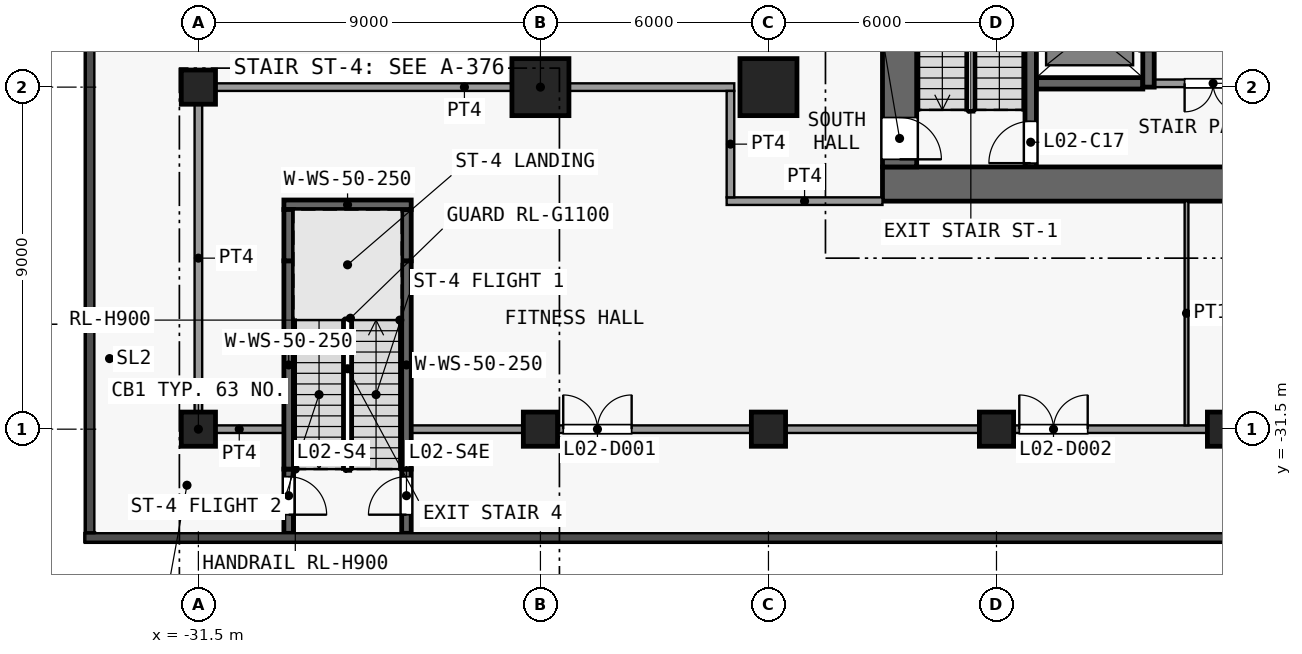
"""IFC4 building model, lengths in metres.
Left out: names, types, materials, properties, quantities, classifications, styles, units other than length and angle.
Written with IfcOpenShell. Run it as: python <this file> out.ifc"""

import sys

from ifc_helpers import new_model, si_unit, direction, frame, frame_2d, origin, origin_2d, place, context, subcontext, project, spatial, rectangle, extrude, element, fill, save


model = new_model("IFC4")
c1 = context("Model", 3, precision=1e-05, world=origin(), true_north=direction((0.0, 1.0)))
c2 = subcontext(c1, "Body", "Model", "MODEL_VIEW")
j1 = project(units=[si_unit("LENGTHUNIT", "METRE"), si_unit("PLANEANGLEUNIT", "RADIAN")], contexts=[c1])
p1 = place(None, origin())
s1 = spatial("IfcSite", under=j1, at=p1, CompositionType="ELEMENT")
p2 = place(p1, origin())
s2 = spatial("IfcBuilding", under=s1, at=p2, CompositionType="ELEMENT")
p3 = place(p2, frame((0.0, 0.0, 13.5)))
s3 = spatial("IfcBuildingStorey", under=s2, at=p3, CompositionType="ELEMENT", Elevation=13.5)
for number, where, z_axis, x_axis in (
    (1, (-31.5, -31.5, 0.0), (0.0, 0.0, 1.0), (1.0, 0.0, 0.0)),
    (2, (-31.5, -22.5, 0.0), (0.0, 0.0, 1.0), (1.0, 0.0, 0.0)),
    (3, (-22.5, -31.5, 0.0), (0.0, 0.0, 1.0), (1.0, 0.0, 0.0)),
):
    element("IfcColumn", number, at=place(p3, frame(where, z_axis=z_axis, x_axis=x_axis)), inside=s3, PredefinedType="COLUMN", context=c2, shape_type="SweptSolid", body=[
        extrude(rectangle(XDim=0.9, YDim=0.9, at=origin_2d()), origin(), (0.0, 0.0, 1.0), 5.0),
    ])
p4 = place(p3, frame((-22.5, -22.5, 0.0), z_axis=(0.0, 0.0, 1.0), x_axis=(1.0, 0.0, 0.0)))
e4 = element("IfcColumn", 4, at=p4, inside=s3, PredefinedType="COLUMN", context=c2, shape_type="SweptSolid", body=[
    extrude(rectangle(XDim=1.5, YDim=1.5, at=origin_2d()), origin(), (0.0, 0.0, 1.0), 5.0),
])
p5 = place(p3, frame((-16.5, -31.5, 0.0), z_axis=(0.0, 0.0, 1.0), x_axis=(1.0, 0.0, 0.0)))
e5 = element("IfcColumn", 5, at=p5, inside=s3, PredefinedType="COLUMN", context=c2, shape_type="SweptSolid", body=[
    extrude(rectangle(XDim=0.9, YDim=0.9, at=origin_2d()), origin(), (0.0, 0.0, 1.0), 5.0),
])
p6 = place(p3, frame((-16.5, -22.5, 0.0), z_axis=(0.0, 0.0, 1.0), x_axis=(1.0, 0.0, 0.0)))
e6 = element("IfcColumn", 6, at=p6, inside=s3, PredefinedType="COLUMN", context=c2, shape_type="SweptSolid", body=[
    extrude(rectangle(XDim=1.5, YDim=1.5, at=origin_2d()), origin(), (0.0, 0.0, 1.0), 5.0),
])
for number, where, z_axis, x_axis in (
    (7, (-10.5, -31.5, 0.0), (0.0, 0.0, 1.0), (1.0, 0.0, 0.0)),
    (8, (-4.5, -31.5, 0.0), (0.0, 0.0, 1.0), (1.0, 0.0, 0.0)),
):
    element("IfcColumn", number, at=place(p3, frame(where, z_axis=z_axis, x_axis=x_axis)), inside=s3, PredefinedType="COLUMN", context=c2, shape_type="SweptSolid", body=[
        extrude(rectangle(XDim=0.9, YDim=0.9, at=origin_2d()), origin(), (0.0, 0.0, 1.0), 5.0),
    ])
p7 = place(p3, frame((-13.5, -25.05, 0.0), z_axis=(0.0, 0.0, 1.0), x_axis=(1.0, 0.0, 0.0)))
e9 = element("IfcWall", 9, at=p7, inside=s3, PredefinedType="SHEAR", context=c2, shape_type="SweptSolid", body=[
    extrude(rectangle(XDim=27.0, YDim=0.9, at=frame_2d((13.5, 0.0))), origin(), (0.0, 0.0, 1.0), 4.65),
])
p8 = place(p3, frame((-13.05, -8.5, 0.0), z_axis=(0.0, 0.0, 1.0), x_axis=(0.0, -1.0, 0.0)))
e10 = element("IfcWall", 10, at=p8, inside=s3, PredefinedType="SHEAR", context=c2, shape_type="SweptSolid", body=[
    extrude(rectangle(XDim=16.1, YDim=0.9, at=frame_2d((8.05, 0.0))), origin(), (0.0, 0.0, 1.0), 4.65),
])
p9 = place(p8, frame((14.8, 0.0, 0.0)))
e11 = element("IfcOpeningElement", 11, at=p9, cuts=e10, PredefinedType="OPENING", context=c2, shape_type="SweptSolid", body=[
    extrude(rectangle(XDim=1.1, YDim=2.1, at=frame_2d((0.55, 1.05))), frame((0.0, 0.46, 0.0), z_axis=(0.0, -1.0, 0.0), x_axis=(1.0, 0.0, 0.0)), (0.0, 0.0, 1.0), 0.92),
])
p10 = place(p3, frame((-9.45, -22.4, 0.0), z_axis=(0.0, 0.0, 1.0), x_axis=(1.0, 0.0, 0.0)))
e12 = element("IfcWall", 12, at=p10, inside=s3, PredefinedType="SHEAR", context=c2, shape_type="SweptSolid", body=[
    extrude(rectangle(XDim=2.8, YDim=0.3, at=frame_2d((1.4, 0.0))), origin(), (0.0, 0.0, 1.0), 4.65),
])
p11 = place(p3, frame((-3.25, -22.4, 0.0), z_axis=(0.0, 0.0, 1.0), x_axis=(-1.0, 0.0, 0.0)))
e13 = element("IfcWall", 13, at=p11, inside=s3, PredefinedType="PARTITIONING", context=c2, shape_type="SweptSolid", body=[
    extrude(rectangle(XDim=3.1, YDim=0.2, at=frame_2d((1.55, 0.0))), origin(), (0.0, 0.0, 1.0), 4.65),
])
p12 = place(p11, frame((0.8, 0.0, 0.0)))
e14 = element("IfcOpeningElement", 14, at=p12, cuts=e13, PredefinedType="OPENING", context=c2, shape_type="SweptSolid", body=[
    extrude(rectangle(XDim=1.5, YDim=2.1, at=frame_2d((0.75, 1.05))), frame((0.0, 0.11, 0.0), z_axis=(0.0, -1.0, 0.0), x_axis=(1.0, 0.0, 0.0)), (0.0, 0.0, 1.0), 0.22),
])
p13 = place(p3, frame((-9.6, -24.6, 0.0), z_axis=(0.0, 0.0, 1.0), x_axis=(0.0, 1.0, 0.0)))
e15 = element("IfcWall", 15, at=p13, inside=s3, PredefinedType="SHEAR", context=c2, shape_type="SweptSolid", body=[
    extrude(rectangle(XDim=7.7, YDim=0.3, at=frame_2d((3.85, 0.0))), origin(), (0.0, 0.0, 1.0), 4.65),
])
p14 = place(p13, frame((0.1, 0.0, 0.0)))
e16 = element("IfcOpeningElement", 16, at=p14, cuts=e15, PredefinedType="OPENING", context=c2, shape_type="SweptSolid", body=[
    extrude(rectangle(XDim=1.1, YDim=2.1, at=frame_2d((0.55, 1.05))), frame((0.0, 0.16, 0.0), z_axis=(0.0, -1.0, 0.0), x_axis=(1.0, 0.0, 0.0)), (0.0, 0.0, 1.0), 0.32),
])
p15 = place(p3, frame((-6.5, -22.5, 0.0), z_axis=(0.0, 0.0, 1.0), x_axis=(0.0, 1.0, 0.0)))
e17 = element("IfcWall", 17, at=p15, inside=s3, PredefinedType="SHEAR", context=c2, shape_type="SweptSolid", body=[
    extrude(rectangle(XDim=14.0, YDim=0.3, at=frame_2d((7.0, 0.0))), origin(), (0.0, 0.0, 1.0), 4.65),
])
p16 = place(p15, frame((0.94, 0.0, 0.0)))
e18 = element("IfcOpeningElement", 18, at=p16, cuts=e17, PredefinedType="OPENING", context=c2, shape_type="SweptSolid", body=[
    extrude(rectangle(XDim=1.1, YDim=2.1, at=frame_2d((0.55, 1.05))), frame((0.0, 0.16, 0.0), z_axis=(0.0, -1.0, 0.0), x_axis=(1.0, 0.0, 0.0)), (0.0, 0.0, 1.0), 0.32),
])
p17 = place(p15, frame((3.72, 0.0, 0.0)))
e19 = element("IfcOpeningElement", 19, at=p17, cuts=e17, PredefinedType="OPENING", context=c2, shape_type="SweptSolid", body=[
    extrude(rectangle(XDim=1.1, YDim=2.1, at=frame_2d((0.55, 1.05))), frame((0.0, 0.16, 0.0), z_axis=(0.0, -1.0, 0.0), x_axis=(1.0, 0.0, 0.0)), (0.0, 0.0, 1.0), 0.32),
])
p18 = place(p15, frame((6.5, 0.0, 0.0)))
e20 = element("IfcOpeningElement", 20, at=p18, cuts=e17, PredefinedType="OPENING", context=c2, shape_type="SweptSolid", body=[
    extrude(rectangle(XDim=1.1, YDim=2.1, at=frame_2d((0.55, 1.05))), frame((0.0, 0.16, 0.0), z_axis=(0.0, -1.0, 0.0), x_axis=(1.0, 0.0, 0.0)), (0.0, 0.0, 1.0), 0.32),
])
p19 = place(p15, frame((9.28, 0.0, 0.0)))
e21 = element("IfcOpeningElement", 21, at=p19, cuts=e17, PredefinedType="OPENING", context=c2, shape_type="SweptSolid", body=[
    extrude(rectangle(XDim=1.1, YDim=2.1, at=frame_2d((0.55, 1.05))), frame((0.0, 0.16, 0.0), z_axis=(0.0, -1.0, 0.0), x_axis=(1.0, 0.0, 0.0)), (0.0, 0.0, 1.0), 0.32),
])
p20 = place(p15, frame((12.06, 0.0, 0.0)))
e22 = element("IfcOpeningElement", 22, at=p20, cuts=e17, PredefinedType="OPENING", context=c2, shape_type="SweptSolid", body=[
    extrude(rectangle(XDim=1.1, YDim=2.1, at=frame_2d((0.55, 1.05))), frame((0.0, 0.16, 0.0), z_axis=(0.0, -1.0, 0.0), x_axis=(1.0, 0.0, 0.0)), (0.0, 0.0, 1.0), 0.32),
])
p21 = place(p3, frame((-29.125, -32.55, 0.0), z_axis=(0.0, 0.0, 1.0), x_axis=(0.0, -1.0, 0.0)))
e23 = element("IfcWall", 23, at=p21, inside=s3, PredefinedType="SHEAR", context=c2, shape_type="SweptSolid", body=[
    extrude(rectangle(XDim=1.69, YDim=0.25, at=frame_2d((0.845, 0.0))), origin(), (0.0, 0.0, 1.0), 4.65),
])
p22 = place(p21, frame((0.2, 0.0, 0.0)))
e24 = element("IfcOpeningElement", 24, at=p22, cuts=e23, PredefinedType="OPENING", context=c2, shape_type="SweptSolid", body=[
    extrude(rectangle(XDim=1.0, YDim=2.1, at=frame_2d((0.5, 1.05))), frame((0.0, 0.135, 0.0), z_axis=(0.0, -1.0, 0.0), x_axis=(1.0, 0.0, 0.0)), (0.0, 0.0, 1.0), 0.27),
])
p23 = place(p3, frame((-29.125, -32.55, 0.0), z_axis=(0.0, 0.0, 1.0), x_axis=(0.0, 1.0, 0.0)))
e25 = element("IfcWall", 25, at=p23, inside=s3, PredefinedType="SHEAR", context=c2, shape_type="SweptSolid", body=[
    extrude(rectangle(XDim=5.48, YDim=0.25, at=frame_2d((2.74, 0.0))), origin(), (0.0, 0.0, 1.0), 4.65),
])
p24 = place(p3, frame((-29.125, -27.07, 0.0), z_axis=(0.0, 0.0, 1.0), x_axis=(0.0, 1.0, 0.0)))
e26 = element("IfcWall", 26, at=p24, inside=s3, PredefinedType="SHEAR", context=c2, shape_type="SweptSolid", body=[
    extrude(rectangle(XDim=1.35, YDim=0.25, at=frame_2d((0.675, 0.0))), origin(), (0.0, 0.0, 1.0), 4.65),
])
p25 = place(p3, frame((-26.025, -34.24, 0.0), z_axis=(0.0, 0.0, 1.0), x_axis=(0.0, 1.0, 0.0)))
e27 = element("IfcWall", 27, at=p25, inside=s3, PredefinedType="SHEAR", context=c2, shape_type="SweptSolid", body=[
    extrude(rectangle(XDim=1.69, YDim=0.25, at=frame_2d((0.845, 0.0))), origin(), (0.0, 0.0, 1.0), 4.65),
])
p26 = place(p25, frame((0.49, 0.0, 0.0)))
e28 = element("IfcOpeningElement", 28, at=p26, cuts=e27, PredefinedType="OPENING", context=c2, shape_type="SweptSolid", body=[
    extrude(rectangle(XDim=1.0, YDim=2.1, at=frame_2d((0.5, 1.05))), frame((0.0, 0.135, 0.0), z_axis=(0.0, -1.0, 0.0), x_axis=(1.0, 0.0, 0.0)), (0.0, 0.0, 1.0), 0.27),
])
p27 = place(p3, frame((-26.025, -32.55, 0.0), z_axis=(0.0, 0.0, 1.0), x_axis=(0.0, 1.0, 0.0)))
e29 = element("IfcWall", 29, at=p27, inside=s3, PredefinedType="SHEAR", context=c2, shape_type="SweptSolid", body=[
    extrude(rectangle(XDim=5.48, YDim=0.25, at=frame_2d((2.74, 0.0))), origin(), (0.0, 0.0, 1.0), 4.65),
])
p28 = place(p3, frame((-26.025, -27.07, 0.0), z_axis=(0.0, 0.0, 1.0), x_axis=(0.0, 1.0, 0.0)))
e30 = element("IfcWall", 30, at=p28, inside=s3, PredefinedType="SHEAR", context=c2, shape_type="SweptSolid", body=[
    extrude(rectangle(XDim=1.35, YDim=0.25, at=frame_2d((0.675, 0.0))), origin(), (0.0, 0.0, 1.0), 4.65),
])
p29 = place(p3, frame((-29.25, -25.595, 0.0), z_axis=(0.0, 0.0, 1.0), x_axis=(1.0, 0.0, 0.0)))
e31 = element("IfcWall", 31, at=p29, inside=s3, PredefinedType="SHEAR", context=c2, shape_type="SweptSolid", body=[
    extrude(rectangle(XDim=3.35, YDim=0.25, at=frame_2d((1.675, 0.0))), origin(), (0.0, 0.0, 1.0), 4.65),
])
p30 = place(p3, frame((-31.6, -31.5, 0.0), z_axis=(0.0, 0.0, 1.0), x_axis=(1.0, 0.0, 0.0)))
e32 = element("IfcWall", 32, at=p30, inside=s3, PredefinedType="PARTITIONING", context=c2, shape_type="SweptSolid", body=[
    extrude(rectangle(XDim=2.35, YDim=0.2, at=frame_2d((1.175, 0.0))), origin(), (0.0, 0.0, 1.0), 4.65),
])
p31 = place(p3, frame((-25.9, -31.5, 0.0), z_axis=(0.0, 0.0, 1.0), x_axis=(1.0, 0.0, 0.0)))
e33 = element("IfcWall", 33, at=p31, inside=s3, PredefinedType="PARTITIONING", context=c2, shape_type="SweptSolid", body=[
    extrude(rectangle(XDim=78.15, YDim=0.2, at=frame_2d((39.075, 0.0))), origin(), (0.0, 0.0, 1.0), 4.65),
])
p32 = place(p31, frame((4.0, 0.0, 0.0)))
e34 = element("IfcOpeningElement", 34, at=p32, cuts=e33, PredefinedType="OPENING", context=c2, shape_type="SweptSolid", body=[
    extrude(rectangle(XDim=1.8, YDim=2.1, at=frame_2d((0.9, 1.05))), frame((0.0, 0.11, 0.0), z_axis=(0.0, -1.0, 0.0), x_axis=(1.0, 0.0, 0.0)), (0.0, 0.0, 1.0), 0.22),
])
p33 = place(p31, frame((16.0, 0.0, 0.0)))
e35 = element("IfcOpeningElement", 35, at=p33, cuts=e33, PredefinedType="OPENING", context=c2, shape_type="SweptSolid", body=[
    extrude(rectangle(XDim=1.8, YDim=2.1, at=frame_2d((0.9, 1.05))), frame((0.0, 0.11, 0.0), z_axis=(0.0, -1.0, 0.0), x_axis=(1.0, 0.0, 0.0)), (0.0, 0.0, 1.0), 0.22),
])
p34 = place(p31, frame((24.1, 0.0, 0.0)))
e36 = element("IfcOpeningElement", 36, at=p34, cuts=e33, PredefinedType="OPENING", context=c2, shape_type="SweptSolid", body=[
    extrude(rectangle(XDim=1.0, YDim=2.1, at=frame_2d((0.5, 1.05))), frame((0.0, 0.11, 0.0), z_axis=(0.0, -1.0, 0.0), x_axis=(1.0, 0.0, 0.0)), (0.0, 0.0, 1.0), 0.22),
])
p35 = place(p31, frame((37.0, 0.0, 0.0)))
e37 = element("IfcOpeningElement", 37, at=p35, cuts=e33, PredefinedType="OPENING", context=c2, shape_type="SweptSolid", body=[
    extrude(rectangle(XDim=1.0, YDim=2.1, at=frame_2d((0.5, 1.05))), frame((0.0, 0.11, 0.0), z_axis=(0.0, -1.0, 0.0), x_axis=(1.0, 0.0, 0.0)), (0.0, 0.0, 1.0), 0.22),
])
p36 = place(p31, frame((46.4, 0.0, 0.0)))
e38 = element("IfcOpeningElement", 38, at=p36, cuts=e33, PredefinedType="OPENING", context=c2, shape_type="SweptSolid", body=[
    extrude(rectangle(XDim=1.0, YDim=2.1, at=frame_2d((0.5, 1.05))), frame((0.0, 0.11, 0.0), z_axis=(0.0, -1.0, 0.0), x_axis=(1.0, 0.0, 0.0)), (0.0, 0.0, 1.0), 0.22),
])
p37 = place(p31, frame((54.9, 0.0, 0.0)))
e39 = element("IfcOpeningElement", 39, at=p37, cuts=e33, PredefinedType="OPENING", context=c2, shape_type="SweptSolid", body=[
    extrude(rectangle(XDim=1.0, YDim=2.1, at=frame_2d((0.5, 1.05))), frame((0.0, 0.11, 0.0), z_axis=(0.0, -1.0, 0.0), x_axis=(1.0, 0.0, 0.0)), (0.0, 0.0, 1.0), 0.22),
])
p38 = place(p31, frame((60.1, 0.0, 0.0)))
e40 = element("IfcOpeningElement", 40, at=p38, cuts=e33, PredefinedType="OPENING", context=c2, shape_type="SweptSolid", body=[
    extrude(rectangle(XDim=1.0, YDim=2.1, at=frame_2d((0.5, 1.05))), frame((0.0, 0.11, 0.0), z_axis=(0.0, -1.0, 0.0), x_axis=(1.0, 0.0, 0.0)), (0.0, 0.0, 1.0), 0.22),
])
p39 = place(p31, frame((64.0, 0.0, 0.0)))
e41 = element("IfcOpeningElement", 41, at=p39, cuts=e33, PredefinedType="OPENING", context=c2, shape_type="SweptSolid", body=[
    extrude(rectangle(XDim=1.8, YDim=2.1, at=frame_2d((0.9, 1.05))), frame((0.0, 0.11, 0.0), z_axis=(0.0, -1.0, 0.0), x_axis=(1.0, 0.0, 0.0)), (0.0, 0.0, 1.0), 0.22),
])
p40 = place(p31, frame((73.0, 0.0, 0.0)))
e42 = element("IfcOpeningElement", 42, at=p40, cuts=e33, PredefinedType="OPENING", context=c2, shape_type="SweptSolid", body=[
    extrude(rectangle(XDim=1.8, YDim=2.1, at=frame_2d((0.9, 1.05))), frame((0.0, 0.11, 0.0), z_axis=(0.0, -1.0, 0.0), x_axis=(1.0, 0.0, 0.0)), (0.0, 0.0, 1.0), 0.22),
])
p41 = place(p3, frame((-17.6, -25.5, 0.0), z_axis=(0.0, 0.0, 1.0), x_axis=(1.0, 0.0, 0.0)))
e43 = element("IfcWall", 43, at=p41, inside=s3, PredefinedType="PARTITIONING", context=c2, shape_type="SweptSolid", body=[
    extrude(rectangle(XDim=4.1, YDim=0.2, at=frame_2d((2.05, 0.0))), origin(), (0.0, 0.0, 1.0), 4.65),
])
p42 = place(p3, frame((-31.6, -22.5, 0.0), z_axis=(0.0, 0.0, 1.0), x_axis=(1.0, 0.0, 0.0)))
e44 = element("IfcWall", 44, at=p42, inside=s3, PredefinedType="PARTITIONING", context=c2, shape_type="SweptSolid", body=[
    extrude(rectangle(XDim=14.2, YDim=0.2, at=frame_2d((7.1, 0.0))), origin(), (0.0, 0.0, 1.0), 4.65),
])
p43 = place(p3, frame((-31.5, -31.4, 0.0), z_axis=(0.0, 0.0, 1.0), x_axis=(0.0, 1.0, 0.0)))
e45 = element("IfcWall", 45, at=p43, inside=s3, PredefinedType="PARTITIONING", context=c2, shape_type="SweptSolid", body=[
    extrude(rectangle(XDim=8.8, YDim=0.2, at=frame_2d((4.4, 0.0))), origin(), (0.0, 0.0, 1.0), 4.65),
])
p44 = place(p3, frame((-17.5, -25.4, 0.0), z_axis=(0.0, 0.0, 1.0), x_axis=(0.0, 1.0, 0.0)))
e46 = element("IfcWall", 46, at=p44, inside=s3, PredefinedType="PARTITIONING", context=c2, shape_type="SweptSolid", body=[
    extrude(rectangle(XDim=2.8, YDim=0.2, at=frame_2d((1.4, 0.0))), origin(), (0.0, 0.0, 1.0), 4.65),
])
p45 = place(p3, frame((-5.5, -31.4, 0.0), z_axis=(0.0, 0.0, 1.0), x_axis=(0.0, 1.0, 0.0)))
e47 = element("IfcWall", 47, at=p45, inside=s3, PredefinedType="PARTITIONING", context=c2, shape_type="SweptSolid", body=[
    extrude(rectangle(XDim=5.9, YDim=0.1, at=frame_2d((2.95, 0.0))), origin(), (0.0, 0.0, 1.0), 4.65),
])
p46 = place(p12, origin())
e48 = element("IfcDoor", 48, at=p46, inside=s3, OperationType="DOUBLE_DOOR_SINGLE_SWING", PredefinedType="DOOR", context=c2, shape_type="SweptSolid", body=[
    extrude(rectangle(XDim=1.5, YDim=2.1, at=frame_2d((0.75, 1.05))), frame((0.0, 0.025, 0.0), z_axis=(0.0, -1.0, 0.0), x_axis=(1.0, 0.0, 0.0)), (0.0, 0.0, 1.0), 0.05),
])
fill(e14, e48)
p47 = place(p14, origin())
e49 = element("IfcDoor", 49, at=p47, inside=s3, OperationType="SINGLE_SWING_LEFT", PredefinedType="DOOR", context=c2, shape_type="SweptSolid", body=[
    extrude(rectangle(XDim=1.1, YDim=2.1, at=frame_2d((0.55, 1.05))), frame((0.0, 0.025, 0.0), z_axis=(0.0, -1.0, 0.0), x_axis=(1.0, 0.0, 0.0)), (0.0, 0.0, 1.0), 0.05),
])
fill(e16, e49)
p48 = place(p9, origin())
e50 = element("IfcDoor", 50, at=p48, inside=s3, OperationType="SINGLE_SWING_RIGHT", PredefinedType="DOOR", context=c2, shape_type="SweptSolid", body=[
    extrude(rectangle(XDim=1.1, YDim=2.1, at=frame_2d((0.55, 1.05))), frame((0.0, 0.025, 0.0), z_axis=(0.0, -1.0, 0.0), x_axis=(1.0, 0.0, 0.0)), (0.0, 0.0, 1.0), 0.05),
])
fill(e11, e50)
p49 = place(p22, origin())
e51 = element("IfcDoor", 51, at=p49, inside=s3, OperationType="SINGLE_SWING_RIGHT", PredefinedType="DOOR", context=c2, shape_type="SweptSolid", body=[
    extrude(rectangle(XDim=1.0, YDim=2.1, at=frame_2d((0.5, 1.05))), frame((0.0, 0.025, 0.0), z_axis=(0.0, -1.0, 0.0), x_axis=(1.0, 0.0, 0.0)), (0.0, 0.0, 1.0), 0.05),
])
fill(e24, e51)
p50 = place(p26, origin())
e52 = element("IfcDoor", 52, at=p50, inside=s3, OperationType="SINGLE_SWING_LEFT", PredefinedType="DOOR", context=c2, shape_type="SweptSolid", body=[
    extrude(rectangle(XDim=1.0, YDim=2.1, at=frame_2d((0.5, 1.05))), frame((0.0, 0.025, 0.0), z_axis=(0.0, -1.0, 0.0), x_axis=(1.0, 0.0, 0.0)), (0.0, 0.0, 1.0), 0.05),
])
fill(e28, e52)
p51 = place(p32, origin())
e53 = element("IfcDoor", 53, at=p51, inside=s3, OperationType="DOUBLE_DOOR_SINGLE_SWING", PredefinedType="DOOR", context=c2, shape_type="SweptSolid", body=[
    extrude(rectangle(XDim=1.8, YDim=2.1, at=frame_2d((0.9, 1.05))), frame((0.0, 0.025, 0.0), z_axis=(0.0, -1.0, 0.0), x_axis=(1.0, 0.0, 0.0)), (0.0, 0.0, 1.0), 0.05),
])
fill(e34, e53)
p52 = place(p33, origin())
e54 = element("IfcDoor", 54, at=p52, inside=s3, OperationType="DOUBLE_DOOR_SINGLE_SWING", PredefinedType="DOOR", context=c2, shape_type="SweptSolid", body=[
    extrude(rectangle(XDim=1.8, YDim=2.1, at=frame_2d((0.9, 1.05))), frame((0.0, 0.025, 0.0), z_axis=(0.0, -1.0, 0.0), x_axis=(1.0, 0.0, 0.0)), (0.0, 0.0, 1.0), 0.05),
])
fill(e35, e54)
save(model, sys.argv[1])
